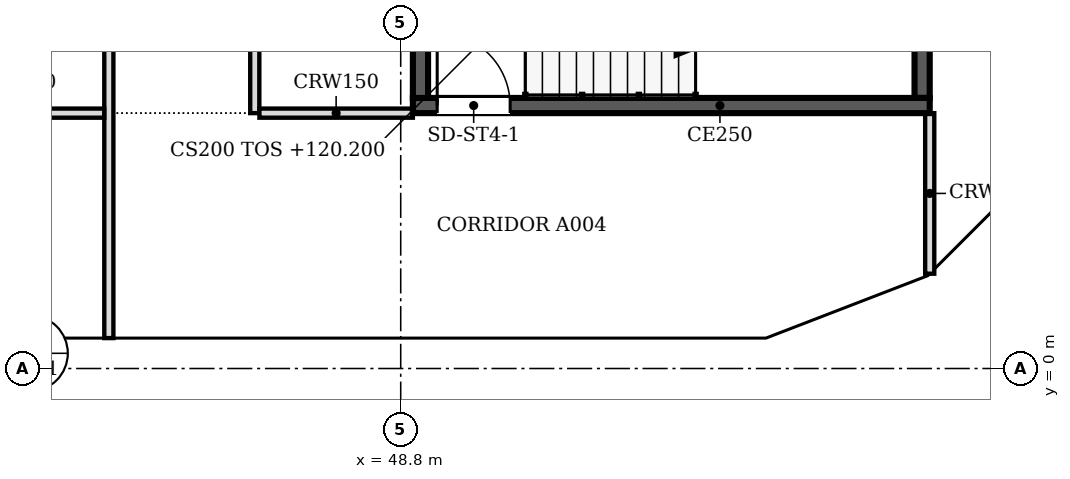
"""IFC4 building model, lengths in metres.
Left out: names, types, materials, properties, quantities, classifications, styles, units other than length and angle.
Written with IfcOpenShell. Run it as: python <this file> out.ifc"""

import sys

from ifc_helpers import new_model, si_unit, direction, frame, frame_2d, origin, place, context, subcontext, project, spatial, polyline, rectangle, outline, extrude, faceted_brep, source, transform, mapped, element, fill, save


model = new_model("IFC4")
c1 = context("Model", 3, precision=1e-05, world=origin(), true_north=direction((0.0, 1.0)))
c2 = subcontext(c1, "Body", "Model", "MODEL_VIEW")
j1 = project(units=[si_unit("LENGTHUNIT", "METRE"), si_unit("PLANEANGLEUNIT", "RADIAN")], contexts=[c1])
p1 = place(None, origin())
s1 = spatial("IfcSite", under=j1, at=p1, CompositionType="ELEMENT")
p2 = place(p1, origin())
s2 = spatial("IfcBuilding", under=s1, at=p2, CompositionType="ELEMENT")
p3 = place(p2, frame((0.0, 0.0, 120.2)))
s3 = spatial("IfcBuildingStorey", under=s2, at=p3, CompositionType="ELEMENT", Elevation=120.2)
m1 = source(origin(), c2, "Body", "SweptSolid", [
    extrude(outline(polyline([(3.05, 0.0), (6.1, 3.8), (3.05, 7.6), (0.0, 3.8), (3.05, 0.0)])), frame((0.0, 0.25, 0.0), z_axis=(0.0, -1.0, 0.0), x_axis=(1.0, 0.0, 0.0)), (0.0, 0.0, 1.0), 0.5),
])
p4 = place(p3, frame((39.65, 0.25, -3.8), z_axis=(0.0, 0.0, 1.0), x_axis=(1.0, 0.0, 0.0)))
e1 = element("IfcWall", 1, at=p4, inside=s3, PredefinedType="SOLIDWALL", context=c2, shape_type="MappedRepresentation", body=[
    mapped(m1, transform((0.0, 0.0, 0.0), scale=1.0)),
])
m2 = source(origin(), c2, "Body", "SweptSolid", [
    extrude(outline(polyline([(3.05, 0.399), (5.78, 3.8), (3.05, 7.201), (0.321, 3.8), (3.05, 0.399)])), frame((0.0, 0.26, 0.0), z_axis=(0.0, -1.0, 0.0), x_axis=(1.0, 0.0, 0.0)), (0.0, 0.0, 1.0), 0.52),
])
p5 = place(p4, origin())
e2 = element("IfcOpeningElement", 2, at=p5, cuts=e1, PredefinedType="OPENING", context=c2, shape_type="MappedRepresentation", body=[
    mapped(m2, transform((0.0, 0.0, 0.0), scale=1.0)),
])
p6 = place(p3, frame((45.75, 0.25, -3.8), z_axis=(0.0, 0.0, 1.0), x_axis=(1.0, 0.0, 0.0)))
e3 = element("IfcWall", 3, at=p6, inside=s3, PredefinedType="SOLIDWALL", context=c2, shape_type="MappedRepresentation", body=[
    mapped(m1, transform((0.0, 0.0, 0.0), scale=1.0)),
])
p7 = place(p6, origin())
e4 = element("IfcOpeningElement", 4, at=p7, cuts=e3, PredefinedType="OPENING", context=c2, shape_type="MappedRepresentation", body=[
    mapped(m2, transform((0.0, 0.0, 0.0), scale=1.0)),
])
m3 = source(origin(), c2, "Body", "Brep", [
    faceted_brep([(3.003, -0.25, 0.0), (3.05, -0.25, 0.06), (3.05, -0.25, 7.54), (3.003, -0.25, 7.6), (0.0, -0.25, 3.8), (0.0, 0.25, 3.8), (2.957, 0.25, 7.541), (2.957, 0.25, 0.059), (3.003, 0.0, 0.0), (3.003, 0.0, 7.6)], [[[0, 1, 2, 3, 4]], [[5, 6, 7]], [[1, 0, 8]], [[9, 3, 2]], [[6, 5, 4, 3, 9]], [[5, 7, 8, 0, 4]], [[1, 8, 7, 6, 9, 2]]]),
])
p8 = place(p3, frame((51.85, 0.25, -3.8), z_axis=(0.0, 0.0, 1.0), x_axis=(1.0, 0.0, 0.0)))
e5 = element("IfcWall", 5, at=p8, inside=s3, PredefinedType="SOLIDWALL", context=c2, shape_type="MappedRepresentation", body=[
    mapped(m3, transform((0.0, 0.0, 0.0), scale=1.0)),
])
m4 = source(origin(), c2, "Body", "SweptSolid", [
    extrude(outline(polyline([(2.803, 6.944), (0.319, 3.8), (2.803, 0.656), (2.803, 6.944)])), frame((0.0, 0.26, 0.0), z_axis=(0.0, -1.0, 0.0), x_axis=(1.0, 0.0, 0.0)), (0.0, 0.0, 1.0), 0.52),
])
p9 = place(p8, origin())
e6 = element("IfcOpeningElement", 6, at=p9, cuts=e5, PredefinedType="OPENING", context=c2, shape_type="MappedRepresentation", body=[
    mapped(m4, transform((0.0, 0.0, 0.0), scale=1.0)),
])
m5 = source(origin(), c2, "Body", "Brep", [
    faceted_brep([(0.047, -0.25, 0.0), (2.997, -0.25, 3.8), (0.047, -0.25, 7.6), (0.0, -0.25, 7.541), (0.0, -0.25, 0.059), (0.093, 0.25, 7.54), (2.944, 0.25, 3.868), (2.944, 0.25, 3.732), (0.093, 0.25, 0.06), (2.997, 0.0, 3.8), (0.047, 0.0, 0.0), (0.047, 0.0, 7.6)], [[[0, 1, 2, 3, 4]], [[5, 6, 7, 8]], [[8, 7, 9, 1, 0, 10]], [[6, 5, 11, 2, 1, 9]], [[3, 2, 11]], [[10, 0, 4]], [[8, 10, 4, 3, 11, 5]], [[9, 7, 6]]]),
])
p10 = place(p3, frame((54.81, 0.233, -3.8), z_axis=(0.0, 0.0, 1.0), x_axis=(0.932990326376, 0.359901446078, 0.0)))
e7 = element("IfcWall", 7, at=p10, inside=s3, PredefinedType="SOLIDWALL", context=c2, shape_type="MappedRepresentation", body=[
    mapped(m5, transform((0.0, 0.0, 0.0), scale=1.0)),
])
m6 = source(origin(), c2, "Body", "SweptSolid", [
    extrude(outline(polyline([(0.247, 0.665), (2.681, 3.8), (0.247, 6.935), (0.247, 0.665)])), frame((0.0, 0.26, 0.0), z_axis=(0.0, -1.0, 0.0), x_axis=(1.0, 0.0, 0.0)), (0.0, 0.0, 1.0), 0.52),
])
p11 = place(p10, origin())
e8 = element("IfcOpeningElement", 8, at=p11, cuts=e7, PredefinedType="OPENING", context=c2, shape_type="MappedRepresentation", body=[
    mapped(m6, transform((0.0, 0.0, 0.0), scale=1.0)),
])
m7 = source(origin(), c2, "Body", "Brep", [
    faceted_brep([(2.944, -0.25, 0.0), (2.997, -0.25, 0.068), (2.997, -0.25, 7.532), (2.944, -0.25, 7.6), (0.0, -0.25, 3.8), (0.053, 0.25, 3.868), (2.891, 0.25, 7.532), (2.891, 0.25, 0.068), (0.053, 0.25, 3.732), (2.944, 0.0, 0.0), (2.944, 0.0, 7.6), (0.0, 0.0, 3.8)], [[[0, 1, 2, 3, 4]], [[5, 6, 7, 8]], [[1, 0, 9]], [[10, 3, 2]], [[6, 5, 11, 4, 3, 10]], [[8, 7, 9, 0, 4, 11]], [[8, 11, 5]], [[1, 9, 7, 6, 10, 2]]]),
])
p12 = place(p3, frame((57.606, 1.312, -3.8), z_axis=(0.0, 0.0, 1.0), x_axis=(0.707147509625, 0.707066050402, 0.0)))
e9 = element("IfcWall", 9, at=p12, inside=s3, PredefinedType="SOLIDWALL", context=c2, shape_type="MappedRepresentation", body=[
    mapped(m7, transform((0.0, 0.0, 0.0), scale=1.0)),
])
m8 = source(origin(), c2, "Body", "SweptSolid", [
    extrude(outline(polyline([(2.744, 6.934), (0.316, 3.8), (2.744, 0.667), (2.744, 6.934)])), frame((0.0, 0.26, 0.0), z_axis=(0.0, -1.0, 0.0), x_axis=(1.0, 0.0, 0.0)), (0.0, 0.0, 1.0), 0.52),
])
p13 = place(p12, origin())
e10 = element("IfcOpeningElement", 10, at=p13, cuts=e9, PredefinedType="OPENING", context=c2, shape_type="MappedRepresentation", body=[
    mapped(m8, transform((0.0, 0.0, 0.0), scale=1.0)),
])
p14 = place(p2, frame((0.0, 0.0, 124.0)))
s4 = spatial("IfcBuildingStorey", under=s2, at=p14, CompositionType="ELEMENT", Elevation=124.0)
p15 = place(p14, frame((42.7, 0.25, -3.8), z_axis=(0.0, 0.0, 1.0), x_axis=(1.0, 0.0, 0.0)))
e11 = element("IfcWall", 11, at=p15, inside=s4, PredefinedType="SOLIDWALL", context=c2, shape_type="MappedRepresentation", body=[
    mapped(m1, transform((0.0, 0.0, 0.0), scale=1.0)),
])
p16 = place(p15, origin())
e12 = element("IfcOpeningElement", 12, at=p16, cuts=e11, PredefinedType="OPENING", context=c2, shape_type="MappedRepresentation", body=[
    mapped(m2, transform((0.0, 0.0, 0.0), scale=1.0)),
])
m9 = source(origin(), c2, "Body", "Brep", [
    faceted_brep([(3.05, -0.25, 0.0), (6.053, -0.25, 3.8), (3.05, -0.25, 7.6), (0.0, -0.25, 3.8), (0.0, 0.25, 3.8), (3.05, 0.25, 7.6), (6.007, 0.25, 3.859), (6.007, 0.25, 3.741), (3.05, 0.25, 0.0), (6.053, 0.0, 3.8)], [[[0, 1, 2, 3]], [[4, 5, 6, 7, 8]], [[8, 7, 9, 1, 0]], [[6, 5, 2, 1, 9]], [[5, 4, 3, 2]], [[4, 8, 0, 3]], [[9, 7, 6]]]),
])
p17 = place(p14, frame((48.8, 0.25, -3.8), z_axis=(0.0, 0.0, 1.0), x_axis=(1.0, 0.0, 0.0)))
e13 = element("IfcWall", 13, at=p17, inside=s4, PredefinedType="SOLIDWALL", context=c2, shape_type="MappedRepresentation", body=[
    mapped(m9, transform((0.0, 0.0, 0.0), scale=1.0)),
])
m10 = source(origin(), c2, "Body", "SweptSolid", [
    extrude(outline(polyline([(3.049, 0.401), (5.735, 3.8), (3.049, 7.199), (0.321, 3.8), (3.049, 0.401)])), frame((0.0, 0.26, 0.0), z_axis=(0.0, -1.0, 0.0), x_axis=(1.0, 0.0, 0.0)), (0.0, 0.0, 1.0), 0.52),
])
p18 = place(p17, origin())
e14 = element("IfcOpeningElement", 14, at=p18, cuts=e13, PredefinedType="OPENING", context=c2, shape_type="MappedRepresentation", body=[
    mapped(m10, transform((0.0, 0.0, 0.0), scale=1.0)),
])
m11 = source(origin(), c2, "Body", "Brep", [
    faceted_brep([(2.95, -0.25, 0.0), (3.003, -0.25, 0.068), (3.003, -0.25, 7.532), (2.95, -0.25, 7.6), (0.0, -0.25, 3.8), (0.047, 0.25, 3.86), (2.898, 0.25, 7.532), (2.898, 0.25, 0.068), (0.047, 0.25, 3.74), (2.95, 0.0, 0.0), (2.95, 0.0, 7.6), (0.0, 0.0, 3.8)], [[[0, 1, 2, 3, 4]], [[5, 6, 7, 8]], [[1, 0, 9]], [[10, 3, 2]], [[6, 5, 11, 4, 3, 10]], [[8, 7, 9, 0, 4, 11]], [[8, 11, 5]], [[1, 9, 7, 6, 10, 2]]]),
])
p19 = place(p14, frame((54.854, 0.25, -3.8), z_axis=(0.0, 0.0, 1.0), x_axis=(0.932970071518, 0.359953949349, 0.0)))
e15 = element("IfcWall", 15, at=p19, inside=s4, PredefinedType="SOLIDWALL", context=c2, shape_type="MappedRepresentation", body=[
    mapped(m11, transform((0.0, 0.0, 0.0), scale=1.0)),
])
m12 = source(origin(), c2, "Body", "SweptSolid", [
    extrude(outline(polyline([(2.75, 6.935), (0.316, 3.8), (2.75, 0.665), (2.75, 6.935)])), frame((0.0, 0.26, 0.0), z_axis=(0.0, -1.0, 0.0), x_axis=(1.0, 0.0, 0.0)), (0.0, 0.0, 1.0), 0.52),
])
p20 = place(p19, origin())
e16 = element("IfcOpeningElement", 16, at=p20, cuts=e15, PredefinedType="OPENING", context=c2, shape_type="MappedRepresentation", body=[
    mapped(m12, transform((0.0, 0.0, 0.0), scale=1.0)),
])
m13 = source(origin(), c2, "Body", "Brep", [
    faceted_brep([(0.053, -0.25, 0.0), (2.997, -0.25, 3.8), (0.053, -0.25, 7.6), (0.0, -0.25, 7.532), (0.0, -0.25, 0.068), (0.106, 0.25, 7.532), (2.944, 0.25, 3.868), (2.944, 0.25, 3.732), (0.106, 0.25, 0.068), (2.997, 0.0, 3.8), (0.053, 0.0, 0.0), (0.053, 0.0, 7.6)], [[[0, 1, 2, 3, 4]], [[5, 6, 7, 8]], [[8, 7, 9, 1, 0, 10]], [[6, 5, 11, 2, 1, 9]], [[3, 2, 11]], [[10, 0, 4]], [[8, 10, 4, 3, 11, 5]], [[9, 7, 6]]]),
])
p21 = place(p14, frame((57.569, 1.274, -3.8), z_axis=(0.0, 0.0, 1.0), x_axis=(0.707066050402, 0.707147509625, 0.0)))
e17 = element("IfcWall", 17, at=p21, inside=s4, PredefinedType="SOLIDWALL", context=c2, shape_type="MappedRepresentation", body=[
    mapped(m13, transform((0.0, 0.0, 0.0), scale=1.0)),
])
m14 = source(origin(), c2, "Body", "SweptSolid", [
    extrude(outline(polyline([(0.253, 0.666), (2.681, 3.8), (0.253, 6.934), (0.253, 0.666)])), frame((0.0, 0.26, 0.0), z_axis=(0.0, -1.0, 0.0), x_axis=(1.0, 0.0, 0.0)), (0.0, 0.0, 1.0), 0.52),
])
p22 = place(p21, origin())
e18 = element("IfcOpeningElement", 18, at=p22, cuts=e17, PredefinedType="OPENING", context=c2, shape_type="MappedRepresentation", body=[
    mapped(m14, transform((0.0, 0.0, 0.0), scale=1.0)),
])
p23 = place(p3, frame((57.5, 4.325, 0.0), z_axis=(0.0, 0.0, 1.0), x_axis=(-1.0, 0.0, 0.0)))
e19 = element("IfcWall", 19, at=p23, inside=s3, PredefinedType="SOLIDWALL", context=c2, shape_type="SweptSolid", body=[
    extrude(rectangle(XDim=8.5, YDim=0.25, at=frame_2d((4.25, 0.0))), origin(), (0.0, 0.0, 1.0), 3.8),
])
m15 = source(origin(), c2, "Body", "SweptSolid", [
    extrude(rectangle(XDim=1.2, YDim=2.1, at=frame_2d((0.6, 1.05))), frame((0.0, 0.135, 0.0), z_axis=(0.0, -1.0, 0.0), x_axis=(1.0, 0.0, 0.0)), (0.0, 0.0, 1.0), 0.27),
])
p24 = place(p23, frame((6.9, 0.0, 0.0)))
e20 = element("IfcOpeningElement", 20, at=p24, cuts=e19, PredefinedType="OPENING", context=c2, shape_type="MappedRepresentation", body=[
    mapped(m15, transform((0.0, 0.0, 0.0), scale=1.0)),
])
for number, where, z_axis, x_axis in (
    (21, (49.125, 4.45, 0.0), (0.0, 0.0, 1.0), (0.0, 1.0, 0.0)),
    (22, (57.375, 7.85, 0.0), (0.0, 0.0, 1.0), (0.0, -1.0, 0.0)),
):
    element("IfcWall", number, at=place(p3, frame(where, z_axis=z_axis, x_axis=x_axis)), inside=s3, PredefinedType="SOLIDWALL", context=c2, shape_type="SweptSolid", body=[
        extrude(rectangle(XDim=3.4, YDim=0.25, at=frame_2d((1.7, 0.0))), origin(), (0.0, 0.0, 1.0), 3.8),
    ])
p25 = place(p3, frame((44.0, 0.5, 0.0), z_axis=(0.0, 0.0, 1.0), x_axis=(0.0, 1.0, 0.0)))
e23 = element("IfcWall", 23, at=p25, inside=s3, PredefinedType="PARTITIONING", context=c2, shape_type="SweptSolid", body=[
    extrude(rectangle(XDim=21.424, YDim=0.15, at=frame_2d((10.712, 0.0))), origin(), (0.0, 0.0, 1.0), 3.067),
])
m16 = source(origin(), c2, "Body", "SweptSolid", [
    extrude(rectangle(XDim=0.9, YDim=2.1, at=frame_2d((0.45, 1.05))), frame((0.0, 0.085, 0.0), z_axis=(0.0, -1.0, 0.0), x_axis=(1.0, 0.0, 0.0)), (0.0, 0.0, 1.0), 0.17),
])
p26 = place(p25, frame((16.601, 0.0, 0.0)))
e24 = element("IfcOpeningElement", 24, at=p26, cuts=e23, PredefinedType="OPENING", context=c2, shape_type="MappedRepresentation", body=[
    mapped(m16, transform((0.0, 0.0, 0.0), scale=1.0)),
])
m17 = source(origin(), c2, "Body", "SweptSolid", [
    extrude(rectangle(XDim=1.0, YDim=2.1, at=frame_2d((0.5, 1.05))), frame((0.0, 0.085, 0.0), z_axis=(0.0, -1.0, 0.0), x_axis=(1.0, 0.0, 0.0)), (0.0, 0.0, 1.0), 0.17),
])
p27 = place(p25, frame((7.7, 0.0, 0.0)))
e25 = element("IfcOpeningElement", 25, at=p27, cuts=e23, PredefinedType="OPENING", context=c2, shape_type="MappedRepresentation", body=[
    mapped(m17, transform((0.0, 0.0, 0.0), scale=1.0)),
])
p28 = place(p3, frame((57.5, 1.559, 0.0), z_axis=(0.0, 0.0, 1.0), x_axis=(0.0, 1.0, 0.0)))
e26 = element("IfcWall", 26, at=p28, inside=s3, PredefinedType="PARTITIONING", context=c2, shape_type="SweptSolid", body=[
    extrude(rectangle(XDim=2.641, YDim=0.15, at=frame_2d((1.32, 0.0))), origin(), (0.0, 0.0, 1.0), 3.067),
])
p29 = place(p3, frame((40.951, 4.2, 0.0), z_axis=(0.0, 0.0, 1.0), x_axis=(1.0, 0.0, 0.0)))
e27 = element("IfcWall", 27, at=p29, inside=s3, PredefinedType="PARTITIONING", context=c2, shape_type="SweptSolid", body=[
    extrude(rectangle(XDim=2.973, YDim=0.15, at=frame_2d((1.487, 0.0))), origin(), (0.0, 0.0, 1.0), 3.067),
])
p30 = place(p3, frame((46.4, 21.924, 0.0), z_axis=(0.0, 0.0, 1.0), x_axis=(0.0, -1.0, 0.0)))
e28 = element("IfcWall", 28, at=p30, inside=s3, PredefinedType="PARTITIONING", context=c2, shape_type="SweptSolid", body=[
    extrude(rectangle(XDim=17.724, YDim=0.15, at=frame_2d((8.862, 0.0))), origin(), (0.0, 0.0, 1.0), 3.067),
])
p31 = place(p30, frame((3.423, 0.0, 0.0)))
e29 = element("IfcOpeningElement", 29, at=p31, cuts=e28, PredefinedType="OPENING", context=c2, shape_type="MappedRepresentation", body=[
    mapped(m17, transform((0.0, 0.0, 0.0), scale=1.0)),
])
p32 = place(p30, frame((12.324, 0.0, 0.0)))
e30 = element("IfcOpeningElement", 30, at=p32, cuts=e28, PredefinedType="OPENING", context=c2, shape_type="MappedRepresentation", body=[
    mapped(m16, transform((0.0, 0.0, 0.0), scale=1.0)),
])
p33 = place(p3, frame((46.476, 4.2, 0.0), z_axis=(0.0, 0.0, 1.0), x_axis=(1.0, 0.0, 0.0)))
e31 = element("IfcWall", 31, at=p33, inside=s3, PredefinedType="PARTITIONING", context=c2, shape_type="SweptSolid", body=[
    extrude(rectangle(XDim=2.524, YDim=0.15, at=frame_2d((1.262, 0.0))), origin(), (0.0, 0.0, 1.0), 3.067),
])
m18 = source(origin(), c2, "Body", "SweptSolid", [
    extrude(rectangle(XDim=1.2, YDim=2.1, at=frame_2d((0.6, 1.05))), frame((0.0, 0.025, 0.0), z_axis=(0.0, -1.0, 0.0), x_axis=(1.0, 0.0, 0.0)), (0.0, 0.0, 1.0), 0.05),
])
p34 = place(p24, origin())
e32 = element("IfcDoor", 32, at=p34, inside=s3, OperationType="SINGLE_SWING_RIGHT", PredefinedType="DOOR", context=c2, shape_type="MappedRepresentation", body=[
    mapped(m18, transform((0.0, 0.0, 0.0), scale=1.0)),
])
fill(e20, e32)
save(model, sys.argv[1])
